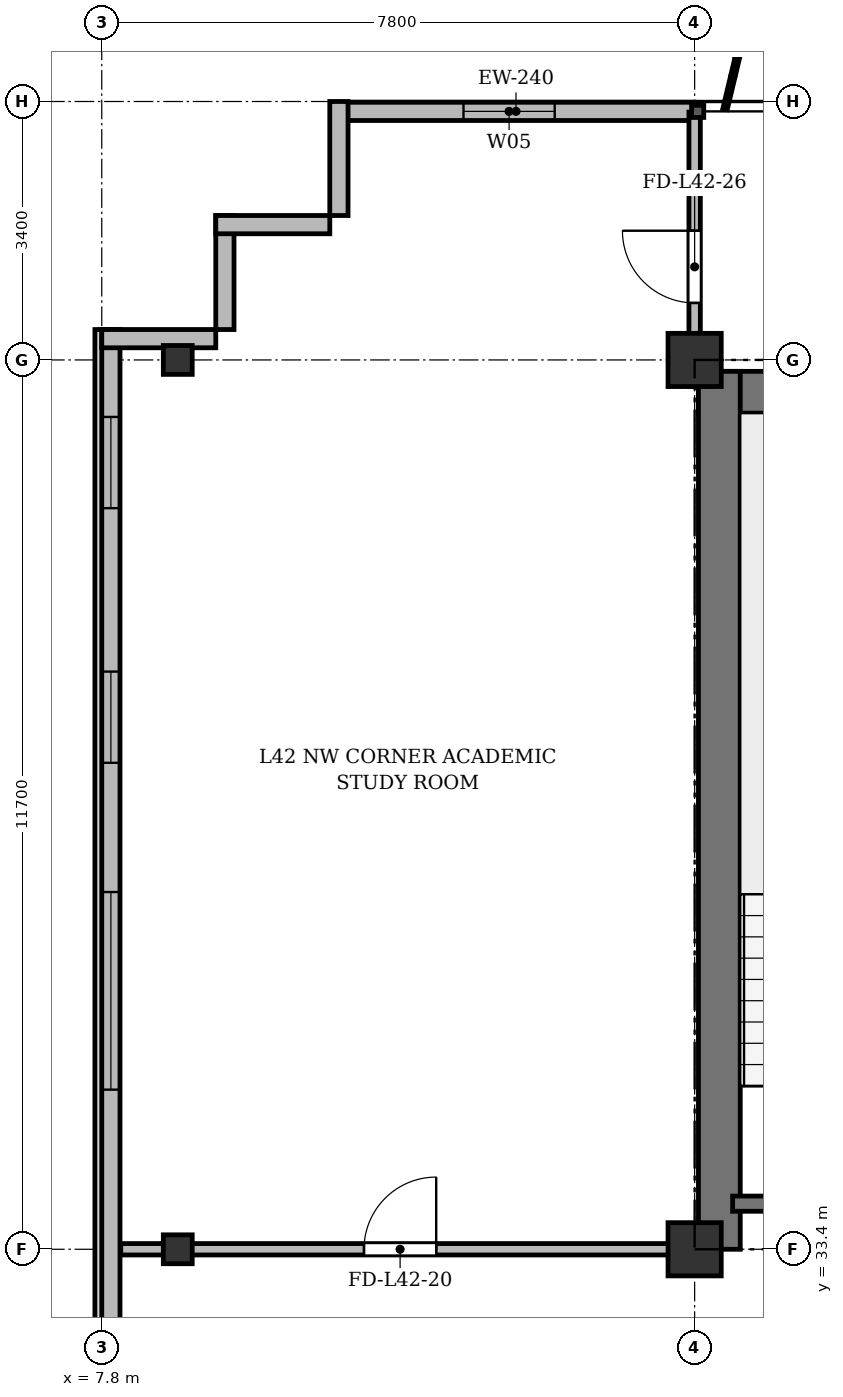
"""IFC4 building model, lengths in metres.
Left out: names, types, materials, properties, quantities, classifications, styles, units other than length and angle.
Written with IfcOpenShell. Run it as: python <this file> out.ifc"""

import sys

from ifc_helpers import new_model, si_unit, direction, frame, frame_2d, origin, origin_2d, place, context, subcontext, project, spatial, rectangle, i_section, extrude, source, transform, mapped, element, fill, save


model = new_model("IFC4")
c1 = context("Model", 3, precision=1e-05, world=origin(), true_north=direction((0.0, 1.0)))
c2 = subcontext(c1, "Body", "Model", "MODEL_VIEW")
j1 = project(units=[si_unit("LENGTHUNIT", "METRE"), si_unit("PLANEANGLEUNIT", "RADIAN")], contexts=[c1])
p1 = place(None, origin())
s1 = spatial("IfcSite", under=j1, at=p1, CompositionType="ELEMENT")
p2 = place(p1, origin())
s2 = spatial("IfcBuilding", under=s1, at=p2, CompositionType="ELEMENT")
p3 = place(p2, frame((0.0, 0.0, 160.9)))
s3 = spatial("IfcBuildingStorey", under=s2, at=p3, CompositionType="ELEMENT", Elevation=160.9)
m1 = source(origin(), c2, "Body", "SweptSolid", [
    extrude(i_section(OverallWidth=0.38, OverallDepth=0.38, WebThickness=0.02, FlangeThickness=0.03, at=origin_2d()), origin(), (0.0, 0.0, 1.0), 3.6),
])
for number, where, z_axis, x_axis in (
    (1, (8.8, 33.4, 0.0), (0.0, 0.0, 1.0), (1.0, 0.0, 0.0)),
    (2, (8.8, 45.1, 0.0), (0.0, 0.0, 1.0), (1.0, 0.0, 0.0)),
):
    element("IfcColumn", number, at=place(p3, frame(where, z_axis=z_axis, x_axis=x_axis)), inside=s3, PredefinedType="COLUMN", context=c2, shape_type="MappedRepresentation", body=[
        mapped(m1, transform((0.0, 0.0, 0.0), x_axis=(1.0, 0.0, 0.0), y_axis=(0.0, 1.0, 0.0), z_axis=(0.0, 0.0, 1.0), scale=1.0)),
    ])
m2 = source(origin(), c2, "Body", "SweptSolid", [
    extrude(rectangle(XDim=0.7, YDim=0.7, at=origin_2d()), origin(), (0.0, 0.0, 1.0), 3.6),
])
for number, where, z_axis, x_axis in (
    (3, (15.6, 33.4, 0.0), (0.0, 0.0, 1.0), (1.0, 0.0, 0.0)),
    (4, (15.6, 45.1, 0.0), (0.0, 0.0, 1.0), (1.0, 0.0, 0.0)),
):
    element("IfcColumn", number, at=place(p3, frame(where, z_axis=z_axis, x_axis=x_axis)), inside=s3, PredefinedType="COLUMN", context=c2, shape_type="MappedRepresentation", body=[
        mapped(m2, transform((0.0, 0.0, 0.0), x_axis=(1.0, 0.0, 0.0), y_axis=(0.0, 1.0, 0.0), z_axis=(0.0, 0.0, 1.0), scale=1.0)),
    ])
p4 = place(p3, frame((10.9, 48.37, 0.0), z_axis=(0.0, 0.0, 1.0), x_axis=(1.0, 0.0, 0.0)))
e5 = element("IfcWall", 5, at=p4, inside=s3, PredefinedType="SOLIDWALL", context=c2, shape_type="SweptSolid", body=[
    extrude(rectangle(XDim=4.7, YDim=0.24, at=frame_2d((2.35, 0.0))), origin(), (0.0, 0.0, 1.0), 3.35),
])
p5 = place(p4, frame((1.659, 0.0, 0.9)))
e6 = element("IfcOpeningElement", 6, at=p5, cuts=e5, PredefinedType="OPENING", context=c2, shape_type="SweptSolid", body=[
    extrude(rectangle(XDim=1.2, YDim=1.65, at=frame_2d((0.6, 0.825))), frame((0.0, 0.13, 0.0), z_axis=(0.0, -1.0, 0.0), x_axis=(1.0, 0.0, 0.0)), (0.0, 0.0, 1.0), 0.26),
])
p6 = place(p3, frame((7.92, 6.3, 0.0), z_axis=(0.0, 0.0, 1.0), x_axis=(0.0, 1.0, 0.0)))
e7 = element("IfcWall", 7, at=p6, inside=s3, PredefinedType="SOLIDWALL", context=c2, shape_type="SweptSolid", body=[
    extrude(rectangle(XDim=39.2, YDim=0.24, at=frame_2d((19.6, 0.0))), origin(), (0.0, 0.0, 1.0), 3.35),
])
p7 = place(p6, frame((1.45, 0.0, 0.92)))
e8 = element("IfcOpeningElement", 8, at=p7, cuts=e7, PredefinedType="OPENING", context=c2, shape_type="SweptSolid", body=[
    extrude(rectangle(XDim=1.2, YDim=1.65, at=frame_2d((0.6, 0.825))), frame((0.0, 0.13, 0.0), z_axis=(0.0, -1.0, 0.0), x_axis=(1.0, 0.0, 0.0)), (0.0, 0.0, 1.0), 0.26),
])
p8 = place(p6, frame((3.8, 0.0, 0.92)))
e9 = element("IfcOpeningElement", 9, at=p8, cuts=e7, PredefinedType="OPENING", context=c2, shape_type="SweptSolid", body=[
    extrude(rectangle(XDim=2.6, YDim=1.9, at=frame_2d((1.3, 0.95))), frame((0.0, 0.13, 0.0), z_axis=(0.0, -1.0, 0.0), x_axis=(1.0, 0.0, 0.0)), (0.0, 0.0, 1.0), 0.26),
])
p9 = place(p6, frame((8.0, 0.0, 0.92)))
e10 = element("IfcOpeningElement", 10, at=p9, cuts=e7, PredefinedType="OPENING", context=c2, shape_type="SweptSolid", body=[
    extrude(rectangle(XDim=2.6, YDim=1.9, at=frame_2d((1.3, 0.95))), frame((0.0, 0.13, 0.0), z_axis=(0.0, -1.0, 0.0), x_axis=(1.0, 0.0, 0.0)), (0.0, 0.0, 1.0), 0.26),
])
p10 = place(p6, frame((15.2, 0.0, 0.92)))
e11 = element("IfcOpeningElement", 11, at=p10, cuts=e7, PredefinedType="OPENING", context=c2, shape_type="SweptSolid", body=[
    extrude(rectangle(XDim=2.6, YDim=1.9, at=frame_2d((1.3, 0.95))), frame((0.0, 0.13, 0.0), z_axis=(0.0, -1.0, 0.0), x_axis=(1.0, 0.0, 0.0)), (0.0, 0.0, 1.0), 0.26),
])
p11 = place(p6, frame((29.2, 0.0, 0.92)))
e12 = element("IfcOpeningElement", 12, at=p11, cuts=e7, PredefinedType="OPENING", context=c2, shape_type="SweptSolid", body=[
    extrude(rectangle(XDim=2.6, YDim=1.9, at=frame_2d((1.3, 0.95))), frame((0.0, 0.13, 0.0), z_axis=(0.0, -1.0, 0.0), x_axis=(1.0, 0.0, 0.0)), (0.0, 0.0, 1.0), 0.26),
])
p12 = place(p6, frame((33.5, 0.0, 0.92)))
e13 = element("IfcOpeningElement", 13, at=p12, cuts=e7, PredefinedType="OPENING", context=c2, shape_type="SweptSolid", body=[
    extrude(rectangle(XDim=1.2, YDim=1.65, at=frame_2d((0.6, 0.825))), frame((0.0, 0.13, 0.0), z_axis=(0.0, -1.0, 0.0), x_axis=(1.0, 0.0, 0.0)), (0.0, 0.0, 1.0), 0.26),
])
p13 = place(p6, frame((36.85, 0.0, 0.92)))
e14 = element("IfcOpeningElement", 14, at=p13, cuts=e7, PredefinedType="OPENING", context=c2, shape_type="SweptSolid", body=[
    extrude(rectangle(XDim=1.2, YDim=1.65, at=frame_2d((0.6, 0.825))), frame((0.0, 0.13, 0.0), z_axis=(0.0, -1.0, 0.0), x_axis=(1.0, 0.0, 0.0)), (0.0, 0.0, 1.0), 0.26),
])
for number, where, z_axis, x_axis in (
    (15, (7.8, 45.38, 0.0), (0.0, 0.0, 1.0), (1.0, 0.0, 0.0)),
    (16, (9.42, 45.5, 0.0), (0.0, 0.0, 1.0), (0.0, 1.0, 0.0)),
    (17, (9.3, 46.88, 0.0), (0.0, 0.0, 1.0), (1.0, 0.0, 0.0)),
    (18, (10.92, 47.0, 0.0), (0.0, 0.0, 1.0), (0.0, 1.0, 0.0)),
):
    element("IfcWall", number, at=place(p3, frame(where, z_axis=z_axis, x_axis=x_axis)), inside=s3, PredefinedType="SOLIDWALL", context=c2, shape_type="SweptSolid", body=[
        extrude(rectangle(XDim=1.5, YDim=0.24, at=frame_2d((0.75, 0.0))), origin(), (0.0, 0.0, 1.0), 3.35),
    ])
p14 = place(p3, frame((15.65, 44.675, 0.0), z_axis=(0.0, 0.0, 1.0), x_axis=(1.0, 0.0, 0.0)))
e19 = element("IfcWall", 19, at=p14, inside=s3, PredefinedType="SHEAR", context=c2, shape_type="SweptSolid", body=[
    extrude(rectangle(XDim=43.1, YDim=0.55, at=frame_2d((21.55, 0.0))), origin(), (0.0, 0.0, 1.0), 3.35),
])
p15 = place(p3, frame((15.925, 33.4, 0.0), z_axis=(0.0, 0.0, 1.0), x_axis=(0.0, 1.0, 0.0)))
e20 = element("IfcWall", 20, at=p15, inside=s3, PredefinedType="SHEAR", context=c2, shape_type="SweptSolid", body=[
    extrude(rectangle(XDim=11.55, YDim=0.55, at=frame_2d((5.775, 0.0))), origin(), (0.0, 0.0, 1.0), 3.35),
])
p16 = place(p3, frame((16.1, 34.0, 0.0), z_axis=(0.0, 0.0, 1.0), x_axis=(1.0, 0.0, 0.0)))
e21 = element("IfcWall", 21, at=p16, inside=s3, PredefinedType="SHEAR", context=c2, shape_type="SweptSolid", body=[
    extrude(rectangle(XDim=3.4, YDim=0.2, at=frame_2d((1.7, 0.0))), origin(), (0.0, 0.0, 1.0), 3.35),
])
p17 = place(p3, frame((8.05, 33.4, 0.0), z_axis=(0.0, 0.0, 1.0), x_axis=(1.0, 0.0, 0.0)))
e22 = element("IfcWall", 22, at=p17, inside=s3, PredefinedType="PARTITIONING", context=c2, shape_type="SweptSolid", body=[
    extrude(rectangle(XDim=7.55, YDim=0.15, at=frame_2d((3.775, 0.0))), origin(), (0.0, 0.0, 1.0), 2.75),
])
p18 = place(p17, frame((3.2, 0.0, 0.0)))
e23 = element("IfcOpeningElement", 23, at=p18, cuts=e22, PredefinedType="OPENING", context=c2, shape_type="SweptSolid", body=[
    extrude(rectangle(XDim=0.95, YDim=2.15, at=frame_2d((0.475, 1.075))), frame((0.0, 0.085, 0.0), z_axis=(0.0, -1.0, 0.0), x_axis=(1.0, 0.0, 0.0)), (0.0, 0.0, 1.0), 0.17),
])
p19 = place(p3, frame((15.6, 44.75, 0.0), z_axis=(0.0, 0.0, 1.0), x_axis=(0.0, 1.0, 0.0)))
e24 = element("IfcWall", 24, at=p19, inside=s3, PredefinedType="PARTITIONING", context=c2, shape_type="SweptSolid", body=[
    extrude(rectangle(XDim=3.61, YDim=0.15, at=frame_2d((1.805, 0.0))), origin(), (0.0, 0.0, 1.0), 2.85),
])
p20 = place(p19, frame((1.1, 0.0, 0.0)))
e25 = element("IfcOpeningElement", 25, at=p20, cuts=e24, PredefinedType="OPENING", context=c2, shape_type="SweptSolid", body=[
    extrude(rectangle(XDim=0.95, YDim=2.15, at=frame_2d((0.475, 1.075))), frame((0.0, 0.085, 0.0), z_axis=(0.0, -1.0, 0.0), x_axis=(1.0, 0.0, 0.0)), (0.0, 0.0, 1.0), 0.17),
])
m3 = source(origin(), c2, "Body", "SweptSolid", [
    extrude(rectangle(XDim=1.2, YDim=1.65, at=frame_2d((0.6, 0.825))), frame((0.0, 0.03, 0.0), z_axis=(0.0, -1.0, 0.0), x_axis=(1.0, 0.0, 0.0)), (0.0, 0.0, 1.0), 0.06),
])
p21 = place(p5, origin())
e26 = element("IfcWindow", 26, at=p21, inside=s3, PartitioningType="SINGLE_PANEL", PredefinedType="WINDOW", context=c2, shape_type="MappedRepresentation", body=[
    mapped(m3, transform((0.0, 0.0, 0.0), x_axis=(1.0, 0.0, 0.0), y_axis=(0.0, 1.0, 0.0), z_axis=(0.0, 0.0, 1.0), scale=1.0)),
])
fill(e6, e26)
m4 = source(origin(), c2, "Body", "SweptSolid", [
    extrude(rectangle(XDim=2.6, YDim=1.9, at=frame_2d((1.3, 0.95))), frame((0.0, 0.03, 0.0), z_axis=(0.0, -1.0, 0.0), x_axis=(1.0, 0.0, 0.0)), (0.0, 0.0, 1.0), 0.06),
])
p22 = place(p11, origin())
e27 = element("IfcWindow", 27, at=p22, inside=s3, PartitioningType="SINGLE_PANEL", PredefinedType="WINDOW", context=c2, shape_type="MappedRepresentation", body=[
    mapped(m4, transform((0.0, 0.0, 0.0), x_axis=(1.0, 0.0, 0.0), y_axis=(0.0, 1.0, 0.0), z_axis=(0.0, 0.0, 1.0), scale=1.0)),
])
fill(e12, e27)
p23 = place(p12, origin())
e28 = element("IfcWindow", 28, at=p23, inside=s3, PartitioningType="SINGLE_PANEL", PredefinedType="WINDOW", context=c2, shape_type="MappedRepresentation", body=[
    mapped(m3, transform((0.0, 0.0, 0.0), x_axis=(1.0, 0.0, 0.0), y_axis=(0.0, 1.0, 0.0), z_axis=(0.0, 0.0, 1.0), scale=1.0)),
])
fill(e13, e28)
p24 = place(p13, origin())
e29 = element("IfcWindow", 29, at=p24, inside=s3, PartitioningType="SINGLE_PANEL", PredefinedType="WINDOW", context=c2, shape_type="MappedRepresentation", body=[
    mapped(m3, transform((0.0, 0.0, 0.0), x_axis=(1.0, 0.0, 0.0), y_axis=(0.0, 1.0, 0.0), z_axis=(0.0, 0.0, 1.0), scale=1.0)),
])
fill(e14, e29)
m5 = source(origin(), c2, "Body", "SweptSolid", [
    extrude(rectangle(XDim=0.95, YDim=2.15, at=frame_2d((0.475, 1.075))), frame((0.0, 0.025, 0.0), z_axis=(0.0, -1.0, 0.0), x_axis=(1.0, 0.0, 0.0)), (0.0, 0.0, 1.0), 0.05),
])
p25 = place(p18, origin())
e30 = element("IfcDoor", 30, at=p25, inside=s3, OperationType="SINGLE_SWING_RIGHT", PredefinedType="DOOR", context=c2, shape_type="MappedRepresentation", body=[
    mapped(m5, transform((0.0, 0.0, 0.0), x_axis=(1.0, 0.0, 0.0), y_axis=(0.0, 1.0, 0.0), z_axis=(0.0, 0.0, 1.0), scale=1.0)),
])
fill(e23, e30)
p26 = place(p20, origin())
e31 = element("IfcDoor", 31, at=p26, inside=s3, OperationType="SINGLE_SWING_RIGHT", PredefinedType="DOOR", context=c2, shape_type="MappedRepresentation", body=[
    mapped(m5, transform((0.0, 0.0, 0.0), x_axis=(1.0, 0.0, 0.0), y_axis=(0.0, 1.0, 0.0), z_axis=(0.0, 0.0, 1.0), scale=1.0)),
])
fill(e25, e31)
save(model, sys.argv[1])
